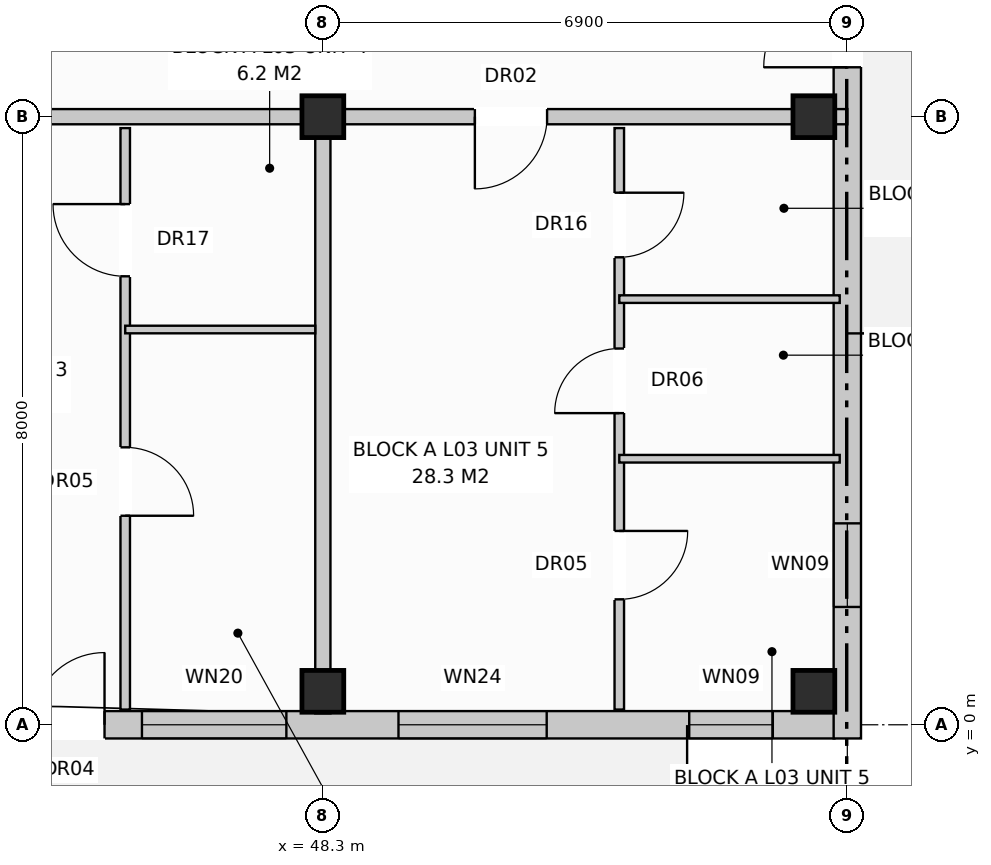
"""IFC4 building model, lengths in metres.
Left out: names, types, materials, properties, quantities, classifications, styles, units other than length and angle.
Written with IfcOpenShell. Run it as: python <this file> out.ifc"""

import sys

from ifc_helpers import new_model, si_unit, direction, frame, frame_2d, origin, origin_with_axes, origin_2d, place, context, subcontext, project, spatial, rectangle, extrude, element, fill, save


model = new_model("IFC4")
c1 = context("Model", 3, precision=1e-05, world=origin(), true_north=direction((0.0, 1.0)))
c2 = subcontext(c1, "Body", "Model", "MODEL_VIEW")
j1 = project(units=[si_unit("LENGTHUNIT", "METRE"), si_unit("PLANEANGLEUNIT", "RADIAN")], contexts=[c1])
p1 = place(None, origin())
s1 = spatial("IfcSite", under=j1, at=p1, CompositionType="ELEMENT")
p2 = place(p1, origin())
s2 = spatial("IfcBuilding", under=s1, at=p2, CompositionType="ELEMENT")
p3 = place(p2, frame((0.0, 0.0, 11.2)))
s3 = spatial("IfcBuildingStorey", under=s2, at=p3, CompositionType="ELEMENT", Elevation=11.2)
for number, where, z_axis, x_axis in (
    (1, (48.3, 0.44, 0.0), (0.0, 0.0, 1.0), (1.0, 0.0, 0.0)),
    (2, (48.3, 8.0, 0.0), (0.0, 0.0, 1.0), (1.0, 0.0, 0.0)),
    (3, (54.76, 0.44, 0.0), (0.0, 0.0, 1.0), (1.0, 0.0, 0.0)),
    (4, (54.76, 8.0, 0.0), (0.0, 0.0, 1.0), (1.0, 0.0, 0.0)),
):
    element("IfcColumn", number, at=place(p3, frame(where, z_axis=z_axis, x_axis=x_axis)), inside=s3, PredefinedType="COLUMN", context=c2, shape_type="SweptSolid", body=[
        extrude(rectangle(XDim=0.55, YDim=0.55, at=origin_2d()), origin(), (0.0, 0.0, 1.0), 3.2),
    ])
p4 = place(p3, frame((0.17, 0.0, 0.0), z_axis=(0.0, 0.0, 1.0), x_axis=(1.0, 0.0, 0.0)))
e5 = element("IfcWall", 5, at=p4, inside=s3, PredefinedType="STANDARD", context=c2, shape_type="SweptSolid", body=[
    extrude(rectangle(XDim=54.86, YDim=0.36, at=frame_2d((27.43, 0.0))), origin(), (0.0, 0.0, 1.0), 2.94),
])
p5 = place(p4, frame((4.903, 0.0, 0.0)))
e6 = element("IfcOpeningElement", 6, at=p5, cuts=e5, PredefinedType="OPENING", context=c2, shape_type="SweptSolid", body=[
    extrude(rectangle(XDim=0.95, YDim=2.1, at=frame_2d((0.475, 1.05))), frame((0.0, 0.192, 0.0), z_axis=(0.0, -1.0, 0.0), x_axis=(1.0, 0.0, 0.0)), (0.0, 0.0, 1.0), 0.384),
])
p6 = place(p4, frame((18.9, 0.0, 0.0)))
e7 = element("IfcOpeningElement", 7, at=p6, cuts=e5, PredefinedType="OPENING", context=c2, shape_type="SweptSolid", body=[
    extrude(rectangle(XDim=0.95, YDim=2.1, at=frame_2d((0.475, 1.05))), frame((0.0, 0.192, 0.0), z_axis=(0.0, -1.0, 0.0), x_axis=(1.0, 0.0, 0.0)), (0.0, 0.0, 1.0), 0.384),
])
p7 = place(p4, frame((31.403, 0.0, 0.0)))
e8 = element("IfcOpeningElement", 8, at=p7, cuts=e5, PredefinedType="OPENING", context=c2, shape_type="SweptSolid", body=[
    extrude(rectangle(XDim=0.95, YDim=2.1, at=frame_2d((0.475, 1.05))), frame((0.0, 0.192, 0.0), z_axis=(0.0, -1.0, 0.0), x_axis=(1.0, 0.0, 0.0)), (0.0, 0.0, 1.0), 0.384),
])
p8 = place(p4, frame((44.308, 0.0, 0.0)))
e9 = element("IfcOpeningElement", 9, at=p8, cuts=e5, PredefinedType="OPENING", context=c2, shape_type="SweptSolid", body=[
    extrude(rectangle(XDim=0.95, YDim=2.1, at=frame_2d((0.475, 1.05))), frame((0.0, 0.192, 0.0), z_axis=(0.0, -1.0, 0.0), x_axis=(1.0, 0.0, 0.0)), (0.0, 0.0, 1.0), 0.384),
])
p9 = place(p4, frame((2.1, 0.0, 0.8)))
e10 = element("IfcOpeningElement", 10, at=p9, cuts=e5, PredefinedType="OPENING", context=c2, shape_type="SweptSolid", body=[
    extrude(rectangle(XDim=1.8, YDim=1.7, at=frame_2d((0.9, 0.85))), frame((0.0, 0.192, 0.0), z_axis=(0.0, -1.0, 0.0), x_axis=(1.0, 0.0, 0.0)), (0.0, 0.0, 1.0), 0.384),
])
p10 = place(p4, frame((7.75, 0.0, 0.72)))
e11 = element("IfcOpeningElement", 11, at=p10, cuts=e5, PredefinedType="OPENING", context=c2, shape_type="SweptSolid", body=[
    extrude(rectangle(XDim=1.9, YDim=1.85, at=frame_2d((0.95, 0.925))), frame((0.0, 0.192, 0.0), z_axis=(0.0, -1.0, 0.0), x_axis=(1.0, 0.0, 0.0)), (0.0, 0.0, 1.0), 0.384),
])
p11 = place(p4, frame((14.55, 0.0, 0.72)))
e12 = element("IfcOpeningElement", 12, at=p11, cuts=e5, PredefinedType="OPENING", context=c2, shape_type="SweptSolid", body=[
    extrude(rectangle(XDim=1.1, YDim=1.5, at=frame_2d((0.55, 0.75))), frame((0.0, 0.192, 0.0), z_axis=(0.0, -1.0, 0.0), x_axis=(1.0, 0.0, 0.0)), (0.0, 0.0, 1.0), 0.384),
])
p12 = place(p4, frame((16.8, 0.0, 0.8)))
e13 = element("IfcOpeningElement", 13, at=p12, cuts=e5, PredefinedType="OPENING", context=c2, shape_type="SweptSolid", body=[
    extrude(rectangle(XDim=1.8, YDim=1.7, at=frame_2d((0.9, 0.85))), frame((0.0, 0.192, 0.0), z_axis=(0.0, -1.0, 0.0), x_axis=(1.0, 0.0, 0.0)), (0.0, 0.0, 1.0), 0.384),
])
p13 = place(p4, frame((21.55, 0.0, 0.72)))
e14 = element("IfcOpeningElement", 14, at=p13, cuts=e5, PredefinedType="OPENING", context=c2, shape_type="SweptSolid", body=[
    extrude(rectangle(XDim=1.9, YDim=1.85, at=frame_2d((0.95, 0.925))), frame((0.0, 0.192, 0.0), z_axis=(0.0, -1.0, 0.0), x_axis=(1.0, 0.0, 0.0)), (0.0, 0.0, 1.0), 0.384),
])
p14 = place(p4, frame((25.35, 0.0, 0.72)))
e15 = element("IfcOpeningElement", 15, at=p14, cuts=e5, PredefinedType="OPENING", context=c2, shape_type="SweptSolid", body=[
    extrude(rectangle(XDim=1.1, YDim=1.5, at=frame_2d((0.55, 0.75))), frame((0.0, 0.192, 0.0), z_axis=(0.0, -1.0, 0.0), x_axis=(1.0, 0.0, 0.0)), (0.0, 0.0, 1.0), 0.384),
])
p15 = place(p4, frame((29.55, 0.0, 0.72)))
e16 = element("IfcOpeningElement", 16, at=p15, cuts=e5, PredefinedType="OPENING", context=c2, shape_type="SweptSolid", body=[
    extrude(rectangle(XDim=1.1, YDim=1.5, at=frame_2d((0.55, 0.75))), frame((0.0, 0.192, 0.0), z_axis=(0.0, -1.0, 0.0), x_axis=(1.0, 0.0, 0.0)), (0.0, 0.0, 1.0), 0.384),
])
p16 = place(p4, frame((34.833, 0.0, 0.72)))
e17 = element("IfcOpeningElement", 17, at=p16, cuts=e5, PredefinedType="OPENING", context=c2, shape_type="SweptSolid", body=[
    extrude(rectangle(XDim=1.9, YDim=1.85, at=frame_2d((0.95, 0.925))), frame((0.0, 0.192, 0.0), z_axis=(0.0, -1.0, 0.0), x_axis=(1.0, 0.0, 0.0)), (0.0, 0.0, 1.0), 0.384),
])
p17 = place(p4, frame((38.45, 0.0, 0.72)))
e18 = element("IfcOpeningElement", 18, at=p17, cuts=e5, PredefinedType="OPENING", context=c2, shape_type="SweptSolid", body=[
    extrude(rectangle(XDim=1.1, YDim=1.5, at=frame_2d((0.55, 0.75))), frame((0.0, 0.192, 0.0), z_axis=(0.0, -1.0, 0.0), x_axis=(1.0, 0.0, 0.0)), (0.0, 0.0, 1.0), 0.384),
])
p18 = place(p4, frame((42.55, 0.0, 0.72)))
e19 = element("IfcOpeningElement", 19, at=p18, cuts=e5, PredefinedType="OPENING", context=c2, shape_type="SweptSolid", body=[
    extrude(rectangle(XDim=1.1, YDim=1.5, at=frame_2d((0.55, 0.75))), frame((0.0, 0.192, 0.0), z_axis=(0.0, -1.0, 0.0), x_axis=(1.0, 0.0, 0.0)), (0.0, 0.0, 1.0), 0.384),
])
p19 = place(p4, frame((45.75, 0.0, 0.72)))
e20 = element("IfcOpeningElement", 20, at=p19, cuts=e5, PredefinedType="OPENING", context=c2, shape_type="SweptSolid", body=[
    extrude(rectangle(XDim=1.9, YDim=1.85, at=frame_2d((0.95, 0.925))), frame((0.0, 0.192, 0.0), z_axis=(0.0, -1.0, 0.0), x_axis=(1.0, 0.0, 0.0)), (0.0, 0.0, 1.0), 0.384),
])
p20 = place(p4, frame((49.125, 0.0, 0.8)))
e21 = element("IfcOpeningElement", 21, at=p20, cuts=e5, PredefinedType="OPENING", context=c2, shape_type="SweptSolid", body=[
    extrude(rectangle(XDim=1.95, YDim=1.65, at=frame_2d((0.975, 0.825))), frame((0.0, 0.192, 0.0), z_axis=(0.0, -1.0, 0.0), x_axis=(1.0, 0.0, 0.0)), (0.0, 0.0, 1.0), 0.384),
])
p21 = place(p4, frame((52.95, 0.0, 0.72)))
e22 = element("IfcOpeningElement", 22, at=p21, cuts=e5, PredefinedType="OPENING", context=c2, shape_type="SweptSolid", body=[
    extrude(rectangle(XDim=1.1, YDim=1.5, at=frame_2d((0.55, 0.75))), frame((0.0, 0.192, 0.0), z_axis=(0.0, -1.0, 0.0), x_axis=(1.0, 0.0, 0.0)), (0.0, 0.0, 1.0), 0.384),
])
p22 = place(p3, frame((55.2, -0.18, 0.0), z_axis=(0.0, 0.0, 1.0), x_axis=(0.0, 1.0, 0.0)))
e23 = element("IfcWall", 23, at=p22, inside=s3, PredefinedType="STANDARD", context=c2, shape_type="SweptSolid", body=[
    extrude(rectangle(XDim=18.76, YDim=0.36, at=frame_2d((9.38, 0.0))), origin(), (0.0, 0.0, 1.0), 2.94),
])
p23 = place(p22, frame((8.83, 0.0, 0.0)))
e24 = element("IfcOpeningElement", 24, at=p23, cuts=e23, PredefinedType="OPENING", context=c2, shape_type="SweptSolid", body=[
    extrude(rectangle(XDim=1.1, YDim=2.1, at=frame_2d((0.55, 1.05))), frame((0.0, 0.192, 0.0), z_axis=(0.0, -1.0, 0.0), x_axis=(1.0, 0.0, 0.0)), (0.0, 0.0, 1.0), 0.384),
])
p24 = place(p22, frame((1.73, 0.0, 0.72)))
e25 = element("IfcOpeningElement", 25, at=p24, cuts=e23, PredefinedType="OPENING", context=c2, shape_type="SweptSolid", body=[
    extrude(rectangle(XDim=1.1, YDim=1.5, at=frame_2d((0.55, 0.75))), frame((0.0, 0.192, 0.0), z_axis=(0.0, -1.0, 0.0), x_axis=(1.0, 0.0, 0.0)), (0.0, 0.0, 1.0), 0.384),
])
p25 = place(p22, frame((15.93, 0.0, 0.72)))
e26 = element("IfcOpeningElement", 26, at=p25, cuts=e23, PredefinedType="OPENING", context=c2, shape_type="SweptSolid", body=[
    extrude(rectangle(XDim=1.1, YDim=1.5, at=frame_2d((0.55, 0.75))), frame((0.0, 0.192, 0.0), z_axis=(0.0, -1.0, 0.0), x_axis=(1.0, 0.0, 0.0)), (0.0, 0.0, 1.0), 0.384),
])
p26 = place(p3, frame((48.3, 7.85, 0.0), z_axis=(0.0, 0.0, 1.0), x_axis=(0.0, -1.0, 0.0)))
e27 = element("IfcWall", 27, at=p26, inside=s3, PredefinedType="PARTITIONING", context=c2, shape_type="SweptSolid", body=[
    extrude(rectangle(XDim=7.7, YDim=0.2, at=frame_2d((3.85, 0.0))), origin(), (0.0, 0.0, 1.0), 2.38),
])
p27 = place(p3, frame((41.4, 8.0, 0.0), z_axis=(0.0, 0.0, 1.0), x_axis=(1.0, 0.0, 0.0)))
e28 = element("IfcWall", 28, at=p27, inside=s3, PredefinedType="PARTITIONING", context=c2, shape_type="SweptSolid", body=[
    extrude(rectangle(XDim=6.9, YDim=0.2, at=frame_2d((3.45, 0.0))), origin(), (0.0, 0.0, 1.0), 2.38),
])
p28 = place(p27, frame((2.0, 0.0, 0.0)))
e29 = element("IfcOpeningElement", 29, at=p28, cuts=e28, PredefinedType="OPENING", context=c2, shape_type="SweptSolid", body=[
    extrude(rectangle(XDim=0.95, YDim=2.15, at=frame_2d((0.475, 1.075))), frame((0.0, 0.112, 0.0), z_axis=(0.0, -1.0, 0.0), x_axis=(1.0, 0.0, 0.0)), (0.0, 0.0, 1.0), 0.224),
])
p29 = place(p3, frame((45.7, 7.85, 0.0), z_axis=(0.0, 0.0, 1.0), x_axis=(0.0, -1.0, 0.0)))
e30 = element("IfcWall", 30, at=p29, inside=s3, PredefinedType="PARTITIONING", context=c2, shape_type="SweptSolid", body=[
    extrude(rectangle(XDim=7.65, YDim=0.125, at=frame_2d((3.825, 0.0))), origin(), (0.0, 0.0, 1.0), 2.94),
])
p30 = place(p29, frame((1.0, 0.0, 0.0)))
e31 = element("IfcOpeningElement", 31, at=p30, cuts=e30, PredefinedType="OPENING", context=c2, shape_type="SweptSolid", body=[
    extrude(rectangle(XDim=0.95, YDim=2.1, at=frame_2d((0.475, 1.05))), frame((0.0, 0.074, 0.0), z_axis=(0.0, -1.0, 0.0), x_axis=(1.0, 0.0, 0.0)), (0.0, 0.0, 1.0), 0.149),
])
p31 = place(p29, frame((4.2, 0.0, 0.0)))
e32 = element("IfcOpeningElement", 32, at=p31, cuts=e30, PredefinedType="OPENING", context=c2, shape_type="SweptSolid", body=[
    extrude(rectangle(XDim=0.9, YDim=2.1, at=frame_2d((0.45, 1.05))), frame((0.0, 0.074, 0.0), z_axis=(0.0, -1.0, 0.0), x_axis=(1.0, 0.0, 0.0)), (0.0, 0.0, 1.0), 0.149),
])
p32 = place(p3, frame((45.7, 5.2, 0.0), z_axis=(0.0, 0.0, 1.0), x_axis=(1.0, 0.0, 0.0)))
e33 = element("IfcWall", 33, at=p32, inside=s3, PredefinedType="PARTITIONING", context=c2, shape_type="SweptSolid", body=[
    extrude(rectangle(XDim=2.5, YDim=0.1, at=frame_2d((1.25, 0.0))), origin(), (0.0, 0.0, 1.0), 2.94),
])
p33 = place(p3, frame((48.3, 8.0, 0.0), z_axis=(0.0, 0.0, 1.0), x_axis=(1.0, 0.0, 0.0)))
e34 = element("IfcWall", 34, at=p33, inside=s3, PredefinedType="PARTITIONING", context=c2, shape_type="SweptSolid", body=[
    extrude(rectangle(XDim=6.9, YDim=0.2, at=frame_2d((3.45, 0.0))), origin(), (0.0, 0.0, 1.0), 2.38),
])
p34 = place(p33, frame((2.0, 0.0, 0.0)))
e35 = element("IfcOpeningElement", 35, at=p34, cuts=e34, PredefinedType="OPENING", context=c2, shape_type="SweptSolid", body=[
    extrude(rectangle(XDim=0.95, YDim=2.15, at=frame_2d((0.475, 1.075))), frame((0.0, 0.112, 0.0), z_axis=(0.0, -1.0, 0.0), x_axis=(1.0, 0.0, 0.0)), (0.0, 0.0, 1.0), 0.224),
])
p35 = place(p3, frame((52.2, 7.85, 0.0), z_axis=(0.0, 0.0, 1.0), x_axis=(0.0, -1.0, 0.0)))
e36 = element("IfcWall", 36, at=p35, inside=s3, PredefinedType="PARTITIONING", context=c2, shape_type="SweptSolid", body=[
    extrude(rectangle(XDim=7.65, YDim=0.125, at=frame_2d((3.825, 0.0))), origin(), (0.0, 0.0, 1.0), 2.94),
])
p36 = place(p35, frame((0.85, 0.0, 0.0)))
e37 = element("IfcOpeningElement", 37, at=p36, cuts=e36, PredefinedType="OPENING", context=c2, shape_type="SweptSolid", body=[
    extrude(rectangle(XDim=0.85, YDim=2.1, at=frame_2d((0.425, 1.05))), frame((0.0, 0.074, 0.0), z_axis=(0.0, -1.0, 0.0), x_axis=(1.0, 0.0, 0.0)), (0.0, 0.0, 1.0), 0.149),
])
p37 = place(p35, frame((2.9, 0.0, 0.0)))
e38 = element("IfcOpeningElement", 38, at=p37, cuts=e36, PredefinedType="OPENING", context=c2, shape_type="SweptSolid", body=[
    extrude(rectangle(XDim=0.85, YDim=2.05, at=frame_2d((0.425, 1.025))), frame((0.0, 0.074, 0.0), z_axis=(0.0, -1.0, 0.0), x_axis=(1.0, 0.0, 0.0)), (0.0, 0.0, 1.0), 0.149),
])
p38 = place(p35, frame((5.3, 0.0, 0.0)))
e39 = element("IfcOpeningElement", 39, at=p38, cuts=e36, PredefinedType="OPENING", context=c2, shape_type="SweptSolid", body=[
    extrude(rectangle(XDim=0.9, YDim=2.1, at=frame_2d((0.45, 1.05))), frame((0.0, 0.074, 0.0), z_axis=(0.0, -1.0, 0.0), x_axis=(1.0, 0.0, 0.0)), (0.0, 0.0, 1.0), 0.149),
])
for number, where, z_axis, x_axis in (
    (40, (52.2, 5.6, 0.0), (0.0, 0.0, 1.0), (1.0, 0.0, 0.0)),
    (41, (52.2, 3.5, 0.0), (0.0, 0.0, 1.0), (1.0, 0.0, 0.0)),
):
    element("IfcWall", number, at=place(p3, frame(where, z_axis=z_axis, x_axis=x_axis)), inside=s3, PredefinedType="PARTITIONING", context=c2, shape_type="SweptSolid", body=[
        extrude(rectangle(XDim=2.9, YDim=0.1, at=frame_2d((1.45, 0.0))), origin(), (0.0, 0.0, 1.0), 2.94),
    ])
p39 = place(p8, origin_with_axes())
e42 = element("IfcDoor", 42, at=p39, inside=s3, OperationType="SINGLE_SWING_RIGHT", PredefinedType="DOOR", context=c2, shape_type="SweptSolid", body=[
    extrude(rectangle(XDim=0.95, YDim=2.1, at=frame_2d((0.475, 1.05))), frame((0.0, 0.025, 0.0), z_axis=(0.0, -1.0, 0.0), x_axis=(1.0, 0.0, 0.0)), (0.0, 0.0, 1.0), 0.05),
])
fill(e9, e42)
p40 = place(p19, origin_with_axes())
e43 = element("IfcWindow", 43, at=p40, inside=s3, PartitioningType="SINGLE_PANEL", PredefinedType="WINDOW", context=c2, shape_type="SweptSolid", body=[
    extrude(rectangle(XDim=1.9, YDim=1.85, at=frame_2d((0.95, 0.925))), frame((0.0, 0.03, 0.0), z_axis=(0.0, -1.0, 0.0), x_axis=(1.0, 0.0, 0.0)), (0.0, 0.0, 1.0), 0.06),
])
fill(e20, e43)
p41 = place(p20, origin_with_axes())
e44 = element("IfcWindow", 44, at=p41, inside=s3, PartitioningType="SINGLE_PANEL", PredefinedType="WINDOW", context=c2, shape_type="SweptSolid", body=[
    extrude(rectangle(XDim=1.95, YDim=1.65, at=frame_2d((0.975, 0.825))), frame((0.0, 0.03, 0.0), z_axis=(0.0, -1.0, 0.0), x_axis=(1.0, 0.0, 0.0)), (0.0, 0.0, 1.0), 0.06),
])
fill(e21, e44)
p42 = place(p21, origin_with_axes())
e45 = element("IfcWindow", 45, at=p42, inside=s3, PartitioningType="SINGLE_PANEL", PredefinedType="WINDOW", context=c2, shape_type="SweptSolid", body=[
    extrude(rectangle(XDim=1.1, YDim=1.5, at=frame_2d((0.55, 0.75))), frame((0.0, 0.03, 0.0), z_axis=(0.0, -1.0, 0.0), x_axis=(1.0, 0.0, 0.0)), (0.0, 0.0, 1.0), 0.06),
])
fill(e22, e45)
p43 = place(p23, origin_with_axes())
e46 = element("IfcDoor", 46, at=p43, inside=s3, OperationType="SINGLE_SWING_LEFT", PredefinedType="DOOR", context=c2, shape_type="SweptSolid", body=[
    extrude(rectangle(XDim=1.1, YDim=2.1, at=frame_2d((0.55, 1.05))), frame((0.0, 0.025, 0.0), z_axis=(0.0, -1.0, 0.0), x_axis=(1.0, 0.0, 0.0)), (0.0, 0.0, 1.0), 0.05),
])
fill(e24, e46)
p44 = place(p24, origin_with_axes())
e47 = element("IfcWindow", 47, at=p44, inside=s3, PartitioningType="SINGLE_PANEL", PredefinedType="WINDOW", context=c2, shape_type="SweptSolid", body=[
    extrude(rectangle(XDim=1.1, YDim=1.5, at=frame_2d((0.55, 0.75))), frame((0.0, 0.03, 0.0), z_axis=(0.0, -1.0, 0.0), x_axis=(1.0, 0.0, 0.0)), (0.0, 0.0, 1.0), 0.06),
])
fill(e25, e47)
p45 = place(p30, frame((0.95, 0.0, 0.0), z_axis=(0.0, 0.0, 1.0), x_axis=(-1.0, 0.0, 0.0)))
e48 = element("IfcDoor", 48, at=p45, inside=s3, OperationType="SINGLE_SWING_LEFT", PredefinedType="DOOR", context=c2, shape_type="SweptSolid", body=[
    extrude(rectangle(XDim=0.95, YDim=2.1, at=frame_2d((0.475, 1.05))), frame((0.0, 0.025, 0.0), z_axis=(0.0, -1.0, 0.0), x_axis=(1.0, 0.0, 0.0)), (0.0, 0.0, 1.0), 0.05),
])
fill(e31, e48)
p46 = place(p31, origin_with_axes())
e49 = element("IfcDoor", 49, at=p46, inside=s3, OperationType="SINGLE_SWING_RIGHT", PredefinedType="DOOR", context=c2, shape_type="SweptSolid", body=[
    extrude(rectangle(XDim=0.9, YDim=2.1, at=frame_2d((0.45, 1.05))), frame((0.0, 0.025, 0.0), z_axis=(0.0, -1.0, 0.0), x_axis=(1.0, 0.0, 0.0)), (0.0, 0.0, 1.0), 0.05),
])
fill(e32, e49)
p47 = place(p34, frame((0.95, 0.0, 0.0), z_axis=(0.0, 0.0, 1.0), x_axis=(-1.0, 0.0, 0.0)))
e50 = element("IfcDoor", 50, at=p47, inside=s3, OperationType="SINGLE_SWING_LEFT", PredefinedType="DOOR", context=c2, shape_type="SweptSolid", body=[
    extrude(rectangle(XDim=0.95, YDim=2.15, at=frame_2d((0.475, 1.075))), frame((0.0, 0.025, 0.0), z_axis=(0.0, -1.0, 0.0), x_axis=(1.0, 0.0, 0.0)), (0.0, 0.0, 1.0), 0.05),
])
fill(e35, e50)
p48 = place(p36, origin_with_axes())
e51 = element("IfcDoor", 51, at=p48, inside=s3, OperationType="SINGLE_SWING_LEFT", PredefinedType="DOOR", context=c2, shape_type="SweptSolid", body=[
    extrude(rectangle(XDim=0.85, YDim=2.1, at=frame_2d((0.425, 1.05))), frame((0.0, 0.025, 0.0), z_axis=(0.0, -1.0, 0.0), x_axis=(1.0, 0.0, 0.0)), (0.0, 0.0, 1.0), 0.05),
])
fill(e37, e51)
p49 = place(p37, frame((0.85, 0.0, 0.0), z_axis=(0.0, 0.0, 1.0), x_axis=(-1.0, 0.0, 0.0)))
e52 = element("IfcDoor", 52, at=p49, inside=s3, OperationType="SINGLE_SWING_RIGHT", PredefinedType="DOOR", context=c2, shape_type="SweptSolid", body=[
    extrude(rectangle(XDim=0.85, YDim=2.05, at=frame_2d((0.425, 1.025))), frame((0.0, 0.025, 0.0), z_axis=(0.0, -1.0, 0.0), x_axis=(1.0, 0.0, 0.0)), (0.0, 0.0, 1.0), 0.05),
])
fill(e38, e52)
p50 = place(p38, origin_with_axes())
e53 = element("IfcDoor", 53, at=p50, inside=s3, OperationType="SINGLE_SWING_LEFT", PredefinedType="DOOR", context=c2, shape_type="SweptSolid", body=[
    extrude(rectangle(XDim=0.9, YDim=2.1, at=frame_2d((0.45, 1.05))), frame((0.0, 0.025, 0.0), z_axis=(0.0, -1.0, 0.0), x_axis=(1.0, 0.0, 0.0)), (0.0, 0.0, 1.0), 0.05),
])
fill(e39, e53)
save(model, sys.argv[1])
